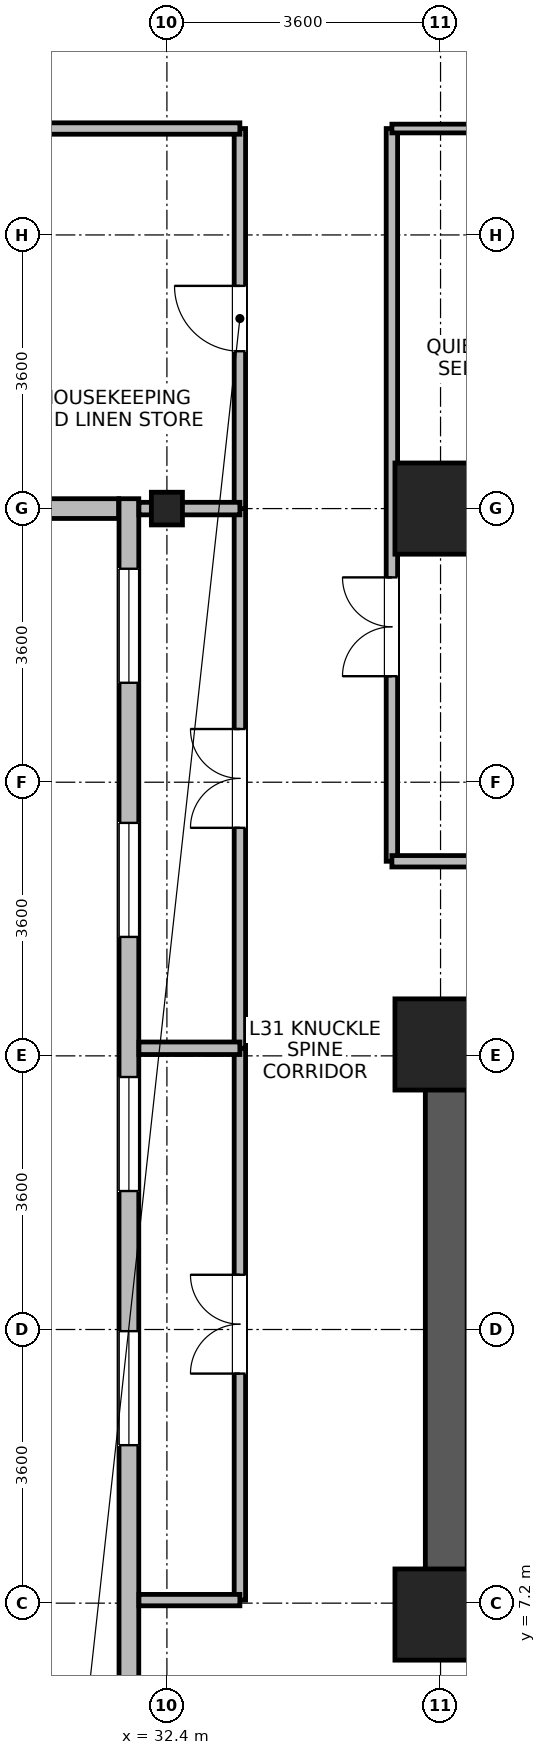
"""IFC4 building model, lengths in metres.
Left out: names, types, materials, properties, quantities, classifications, styles, units other than length and angle.
Written with IfcOpenShell. Run it as: python <this file> out.ifc"""

import sys

from ifc_helpers import new_model, si_unit, direction, frame, frame_2d, origin, origin_2d, place, context, subcontext, project, spatial, rectangle, i_section, extrude, source, transform, mapped, element, fill, save


model = new_model("IFC4")
c1 = context("Model", 3, precision=1e-05, world=origin(), true_north=direction((0.0, 1.0)))
c2 = subcontext(c1, "Body", "Model", "MODEL_VIEW")
j1 = project(units=[si_unit("LENGTHUNIT", "METRE"), si_unit("PLANEANGLEUNIT", "RADIAN")], contexts=[c1])
p1 = place(None, origin())
s1 = spatial("IfcSite", under=j1, at=p1, CompositionType="ELEMENT")
p2 = place(p1, origin())
s2 = spatial("IfcBuilding", under=s1, at=p2, CompositionType="ELEMENT")
p3 = place(p2, frame((0.0, 0.0, 123.0)))
s3 = spatial("IfcBuildingStorey", under=s2, at=p3, CompositionType="ELEMENT", Elevation=123.0)
p4 = place(p3, frame((36.075, 6.75, 0.0), z_axis=(0.0, 0.0, 1.0), x_axis=(0.0, 1.0, 0.0)))
e1 = element("IfcWall", 1, at=p4, inside=s3, PredefinedType="SHEAR", context=c2, shape_type="SweptSolid", body=[
    extrude(rectangle(XDim=8.1, YDim=0.55, at=frame_2d((4.05, 0.0))), origin(), (0.0, 0.0, 1.0), 3.45),
])
m1 = source(origin(), c2, "Body", "SweptSolid", [
    extrude(rectangle(XDim=1.2, YDim=1.2, at=origin_2d()), origin(), (0.0, 0.0, 1.0), 3.7),
])
for number, where, z_axis, x_axis in (
    (2, (36.0, 21.6, 0.0), (0.0, 0.0, 1.0), (1.0, 0.0, 0.0)),
    (3, (36.0, 7.05, 0.0), (0.0, 0.0, 1.0), (1.0, 0.0, 0.0)),
    (4, (36.0, 14.55, 0.0), (0.0, 0.0, 1.0), (1.0, 0.0, 0.0)),
):
    element("IfcColumn", number, at=place(p3, frame(where, z_axis=z_axis, x_axis=x_axis)), inside=s3, PredefinedType="COLUMN", context=c2, shape_type="MappedRepresentation", body=[
        mapped(m1, transform((0.0, 0.0, 0.0), x_axis=(1.0, 0.0, 0.0), y_axis=(0.0, 1.0, 0.0), z_axis=(0.0, 0.0, 1.0), scale=1.0)),
    ])
m2 = source(origin(), c2, "Body", "SweptSolid", [
    extrude(i_section(OverallWidth=0.409, OverallDepth=0.43, WebThickness=0.024, FlangeThickness=0.033, FilletRadius=0.015, at=origin_2d()), origin(), (0.0, 0.0, 1.0), 3.7),
])
p5 = place(p3, frame((32.4, 21.6, 0.0), z_axis=(0.0, 0.0, 1.0), x_axis=(1.0, 0.0, 0.0)))
e5 = element("IfcColumn", 5, at=p5, inside=s3, PredefinedType="COLUMN", context=c2, shape_type="MappedRepresentation", body=[
    mapped(m2, transform((0.0, 0.0, 0.0), x_axis=(1.0, 0.0, 0.0), y_axis=(0.0, 1.0, 0.0), z_axis=(0.0, 0.0, 1.0), scale=1.0)),
])
p6 = place(p3, frame((31.765, 21.6, 0.0), z_axis=(0.0, 0.0, 1.0), x_axis=(-1.0, 0.0, 0.0)))
e6 = element("IfcWall", 6, at=p6, inside=s3, PredefinedType="STANDARD", context=c2, shape_type="SweptSolid", body=[
    extrude(rectangle(XDim=2.364, YDim=0.26, at=frame_2d((1.182, 0.0))), origin(), (0.0, 0.0, 1.0), 2.98),
])
p7 = place(p3, frame((31.9, 1.67, 0.0), z_axis=(0.0, 0.0, 1.0), x_axis=(0.0, 1.0, 0.0)))
e7 = element("IfcWall", 7, at=p7, inside=s3, PredefinedType="STANDARD", context=c2, shape_type="SweptSolid", body=[
    extrude(rectangle(XDim=20.06, YDim=0.26, at=frame_2d((10.03, 0.0))), origin(), (0.0, 0.0, 1.0), 3.43),
])
p8 = place(p7, frame((0.922, 0.0, 0.85)))
e8 = element("IfcOpeningElement", 8, at=p8, cuts=e7, PredefinedType="OPENING", context=c2, shape_type="SweptSolid", body=[
    extrude(rectangle(XDim=1.5, YDim=1.85, at=frame_2d((0.75, 0.925))), frame((0.0, 0.14, 0.0), z_axis=(0.0, -1.0, 0.0), x_axis=(1.0, 0.0, 0.0)), (0.0, 0.0, 1.0), 0.28),
])
p9 = place(p7, frame((7.608, 0.0, 0.85)))
e9 = element("IfcOpeningElement", 9, at=p9, cuts=e7, PredefinedType="OPENING", context=c2, shape_type="SweptSolid", body=[
    extrude(rectangle(XDim=1.5, YDim=1.85, at=frame_2d((0.75, 0.925))), frame((0.0, 0.14, 0.0), z_axis=(0.0, -1.0, 0.0), x_axis=(1.0, 0.0, 0.0)), (0.0, 0.0, 1.0), 0.28),
])
p10 = place(p7, frame((10.952, 0.0, 0.85)))
e10 = element("IfcOpeningElement", 10, at=p10, cuts=e7, PredefinedType="OPENING", context=c2, shape_type="SweptSolid", body=[
    extrude(rectangle(XDim=1.5, YDim=1.85, at=frame_2d((0.75, 0.925))), frame((0.0, 0.14, 0.0), z_axis=(0.0, -1.0, 0.0), x_axis=(1.0, 0.0, 0.0)), (0.0, 0.0, 1.0), 0.28),
])
p11 = place(p7, frame((14.295, 0.0, 0.85)))
e11 = element("IfcOpeningElement", 11, at=p11, cuts=e7, PredefinedType="OPENING", context=c2, shape_type="SweptSolid", body=[
    extrude(rectangle(XDim=1.5, YDim=1.85, at=frame_2d((0.75, 0.925))), frame((0.0, 0.14, 0.0), z_axis=(0.0, -1.0, 0.0), x_axis=(1.0, 0.0, 0.0)), (0.0, 0.0, 1.0), 0.28),
])
p12 = place(p7, frame((17.638, 0.0, 0.85)))
e12 = element("IfcOpeningElement", 12, at=p12, cuts=e7, PredefinedType="OPENING", context=c2, shape_type="SweptSolid", body=[
    extrude(rectangle(XDim=1.5, YDim=1.85, at=frame_2d((0.75, 0.925))), frame((0.0, 0.14, 0.0), z_axis=(0.0, -1.0, 0.0), x_axis=(1.0, 0.0, 0.0)), (0.0, 0.0, 1.0), 0.28),
])
p13 = place(p3, frame((35.36, 16.96, 0.0), z_axis=(0.0, 0.0, 1.0), x_axis=(0.0, 1.0, 0.0)))
e13 = element("IfcWall", 13, at=p13, inside=s3, PredefinedType="PARTITIONING", context=c2, shape_type="SweptSolid", body=[
    extrude(rectangle(XDim=9.64, YDim=0.15, at=frame_2d((4.82, 0.0))), origin(), (0.0, 0.0, 1.0), 3.43),
])
p14 = place(p13, frame((2.435, 0.0, 0.0)))
e14 = element("IfcOpeningElement", 14, at=p14, cuts=e13, PredefinedType="OPENING", context=c2, shape_type="SweptSolid", body=[
    extrude(rectangle(XDim=1.3, YDim=2.12, at=frame_2d((0.65, 1.06))), frame((0.0, 0.085, 0.0), z_axis=(0.0, -1.0, 0.0), x_axis=(1.0, 0.0, 0.0)), (0.0, 0.0, 1.0), 0.17),
])
p15 = place(p3, frame((33.36, 7.24, 0.0), z_axis=(0.0, 0.0, 1.0), x_axis=(0.0, 1.0, 0.0)))
e15 = element("IfcWall", 15, at=p15, inside=s3, PredefinedType="PARTITIONING", context=c2, shape_type="SweptSolid", body=[
    extrude(rectangle(XDim=7.26, YDim=0.15, at=frame_2d((3.63, 0.0))), origin(), (0.0, 0.0, 1.0), 3.43),
])
p16 = place(p15, frame((2.98, 0.0, 0.0)))
e16 = element("IfcOpeningElement", 16, at=p16, cuts=e15, PredefinedType="OPENING", context=c2, shape_type="SweptSolid", body=[
    extrude(rectangle(XDim=1.3, YDim=2.12, at=frame_2d((0.65, 1.06))), frame((0.0, 0.085, 0.0), z_axis=(0.0, -1.0, 0.0), x_axis=(1.0, 0.0, 0.0)), (0.0, 0.0, 1.0), 0.17),
])
p17 = place(p3, frame((33.36, 14.5, 0.0), z_axis=(0.0, 0.0, 1.0), x_axis=(0.0, 1.0, 0.0)))
e17 = element("IfcWall", 17, at=p17, inside=s3, PredefinedType="PARTITIONING", context=c2, shape_type="SweptSolid", body=[
    extrude(rectangle(XDim=7.1, YDim=0.15, at=frame_2d((3.55, 0.0))), origin(), (0.0, 0.0, 1.0), 3.43),
])
p18 = place(p17, frame((2.9, 0.0, 0.0)))
e18 = element("IfcOpeningElement", 18, at=p18, cuts=e17, PredefinedType="OPENING", context=c2, shape_type="SweptSolid", body=[
    extrude(rectangle(XDim=1.3, YDim=2.12, at=frame_2d((0.65, 1.06))), frame((0.0, 0.085, 0.0), z_axis=(0.0, -1.0, 0.0), x_axis=(1.0, 0.0, 0.0)), (0.0, 0.0, 1.0), 0.17),
])
p19 = place(p3, frame((33.36, 21.6, 0.0), z_axis=(0.0, 0.0, 1.0), x_axis=(0.0, 1.0, 0.0)))
e19 = element("IfcWall", 19, at=p19, inside=s3, PredefinedType="PARTITIONING", context=c2, shape_type="SweptSolid", body=[
    extrude(rectangle(XDim=5.0, YDim=0.15, at=frame_2d((2.5, 0.0))), origin(), (0.0, 0.0, 1.0), 3.43),
])
p20 = place(p19, frame((2.07, 0.0, 0.0)))
e20 = element("IfcOpeningElement", 20, at=p20, cuts=e19, PredefinedType="OPENING", context=c2, shape_type="SweptSolid", body=[
    extrude(rectangle(XDim=0.86, YDim=2.02, at=frame_2d((0.43, 1.01))), frame((0.0, 0.085, 0.0), z_axis=(0.0, -1.0, 0.0), x_axis=(1.0, 0.0, 0.0)), (0.0, 0.0, 1.0), 0.17),
])
p21 = place(p3, frame((35.36, 16.96, 0.0), z_axis=(0.0, 0.0, 1.0), x_axis=(1.0, 0.0, 0.0)))
e21 = element("IfcWall", 21, at=p21, inside=s3, PredefinedType="PARTITIONING", context=c2, shape_type="SweptSolid", body=[
    extrude(rectangle(XDim=3.26, YDim=0.15, at=frame_2d((1.63, 0.0))), origin(), (0.0, 0.0, 1.0), 3.43),
])
p22 = place(p3, frame((30.44, 26.6, 0.0), z_axis=(0.0, 0.0, 1.0), x_axis=(1.0, 0.0, 0.0)))
e22 = element("IfcWall", 22, at=p22, inside=s3, PredefinedType="PARTITIONING", context=c2, shape_type="SweptSolid", body=[
    extrude(rectangle(XDim=2.92, YDim=0.15, at=frame_2d((1.46, 0.0))), origin(), (0.0, 0.0, 1.0), 3.43),
])
p23 = place(p3, frame((32.032, 7.24, 0.0), z_axis=(0.0, 0.0, 1.0), x_axis=(1.0, 0.0, 0.0)))
e23 = element("IfcWall", 23, at=p23, inside=s3, PredefinedType="PARTITIONING", context=c2, shape_type="SweptSolid", body=[
    extrude(rectangle(XDim=1.328, YDim=0.15, at=frame_2d((0.664, 0.0))), origin(), (0.0, 0.0, 1.0), 3.43),
])
p24 = place(p3, frame((35.36, 26.6, 0.0), z_axis=(0.0, 0.0, 1.0), x_axis=(1.0, 0.0, 0.0)))
e24 = element("IfcWall", 24, at=p24, inside=s3, PredefinedType="PARTITIONING", context=c2, shape_type="SweptSolid", body=[
    extrude(rectangle(XDim=3.26, YDim=0.115, at=frame_2d((1.63, 0.0))), origin(), (0.0, 0.0, 1.0), 3.43),
])
p25 = place(p3, frame((32.032, 14.5, 0.0), z_axis=(0.0, 0.0, 1.0), x_axis=(1.0, 0.0, 0.0)))
e25 = element("IfcWall", 25, at=p25, inside=s3, PredefinedType="PARTITIONING", context=c2, shape_type="SweptSolid", body=[
    extrude(rectangle(XDim=1.328, YDim=0.165, at=frame_2d((0.664, 0.0))), origin(), (0.0, 0.0, 1.0), 3.43),
])
p26 = place(p3, frame((32.032, 21.6, 0.0), z_axis=(0.0, 0.0, 1.0), x_axis=(1.0, 0.0, 0.0)))
e26 = element("IfcWall", 26, at=p26, inside=s3, PredefinedType="PARTITIONING", context=c2, shape_type="SweptSolid", body=[
    extrude(rectangle(XDim=1.328, YDim=0.165, at=frame_2d((0.664, 0.0))), origin(), (0.0, 0.0, 1.0), 2.98),
])
p27 = place(p9, origin())
e27 = element("IfcWindow", 27, at=p27, inside=s3, PartitioningType="SINGLE_PANEL", PredefinedType="WINDOW", context=c2, shape_type="SweptSolid", body=[
    extrude(rectangle(XDim=1.5, YDim=1.85, at=frame_2d((0.75, 0.925))), frame((0.0, 0.03, 0.0), z_axis=(0.0, -1.0, 0.0), x_axis=(1.0, 0.0, 0.0)), (0.0, 0.0, 1.0), 0.06),
])
fill(e9, e27)
p28 = place(p10, origin())
e28 = element("IfcWindow", 28, at=p28, inside=s3, PartitioningType="SINGLE_PANEL", PredefinedType="WINDOW", context=c2, shape_type="SweptSolid", body=[
    extrude(rectangle(XDim=1.5, YDim=1.85, at=frame_2d((0.75, 0.925))), frame((0.0, 0.03, 0.0), z_axis=(0.0, -1.0, 0.0), x_axis=(1.0, 0.0, 0.0)), (0.0, 0.0, 1.0), 0.06),
])
fill(e10, e28)
p29 = place(p11, origin())
e29 = element("IfcWindow", 29, at=p29, inside=s3, PartitioningType="SINGLE_PANEL", PredefinedType="WINDOW", context=c2, shape_type="SweptSolid", body=[
    extrude(rectangle(XDim=1.5, YDim=1.85, at=frame_2d((0.75, 0.925))), frame((0.0, 0.03, 0.0), z_axis=(0.0, -1.0, 0.0), x_axis=(1.0, 0.0, 0.0)), (0.0, 0.0, 1.0), 0.06),
])
fill(e11, e29)
p30 = place(p12, origin())
e30 = element("IfcWindow", 30, at=p30, inside=s3, PartitioningType="SINGLE_PANEL", PredefinedType="WINDOW", context=c2, shape_type="SweptSolid", body=[
    extrude(rectangle(XDim=1.5, YDim=1.85, at=frame_2d((0.75, 0.925))), frame((0.0, 0.03, 0.0), z_axis=(0.0, -1.0, 0.0), x_axis=(1.0, 0.0, 0.0)), (0.0, 0.0, 1.0), 0.06),
])
fill(e12, e30)
p31 = place(p14, origin())
e31 = element("IfcDoor", 31, at=p31, inside=s3, OperationType="DOUBLE_DOOR_SINGLE_SWING", PredefinedType="DOOR", context=c2, shape_type="SweptSolid", body=[
    extrude(rectangle(XDim=1.3, YDim=2.12, at=frame_2d((0.65, 1.06))), frame((0.0, 0.025, 0.0), z_axis=(0.0, -1.0, 0.0), x_axis=(1.0, 0.0, 0.0)), (0.0, 0.0, 1.0), 0.05),
])
fill(e14, e31)
p32 = place(p16, origin())
e32 = element("IfcDoor", 32, at=p32, inside=s3, OperationType="DOUBLE_DOOR_SINGLE_SWING", PredefinedType="DOOR", context=c2, shape_type="SweptSolid", body=[
    extrude(rectangle(XDim=1.3, YDim=2.12, at=frame_2d((0.65, 1.06))), frame((0.0, 0.025, 0.0), z_axis=(0.0, -1.0, 0.0), x_axis=(1.0, 0.0, 0.0)), (0.0, 0.0, 1.0), 0.05),
])
fill(e16, e32)
p33 = place(p18, origin())
e33 = element("IfcDoor", 33, at=p33, inside=s3, OperationType="DOUBLE_DOOR_SINGLE_SWING", PredefinedType="DOOR", context=c2, shape_type="SweptSolid", body=[
    extrude(rectangle(XDim=1.3, YDim=2.12, at=frame_2d((0.65, 1.06))), frame((0.0, 0.025, 0.0), z_axis=(0.0, -1.0, 0.0), x_axis=(1.0, 0.0, 0.0)), (0.0, 0.0, 1.0), 0.05),
])
fill(e18, e33)
p34 = place(p20, origin())
e34 = element("IfcDoor", 34, at=p34, inside=s3, OperationType="SINGLE_SWING_RIGHT", PredefinedType="DOOR", context=c2, shape_type="SweptSolid", body=[
    extrude(rectangle(XDim=0.86, YDim=2.02, at=frame_2d((0.43, 1.01))), frame((0.0, 0.025, 0.0), z_axis=(0.0, -1.0, 0.0), x_axis=(1.0, 0.0, 0.0)), (0.0, 0.0, 1.0), 0.05),
])
fill(e20, e34)
save(model, sys.argv[1])
